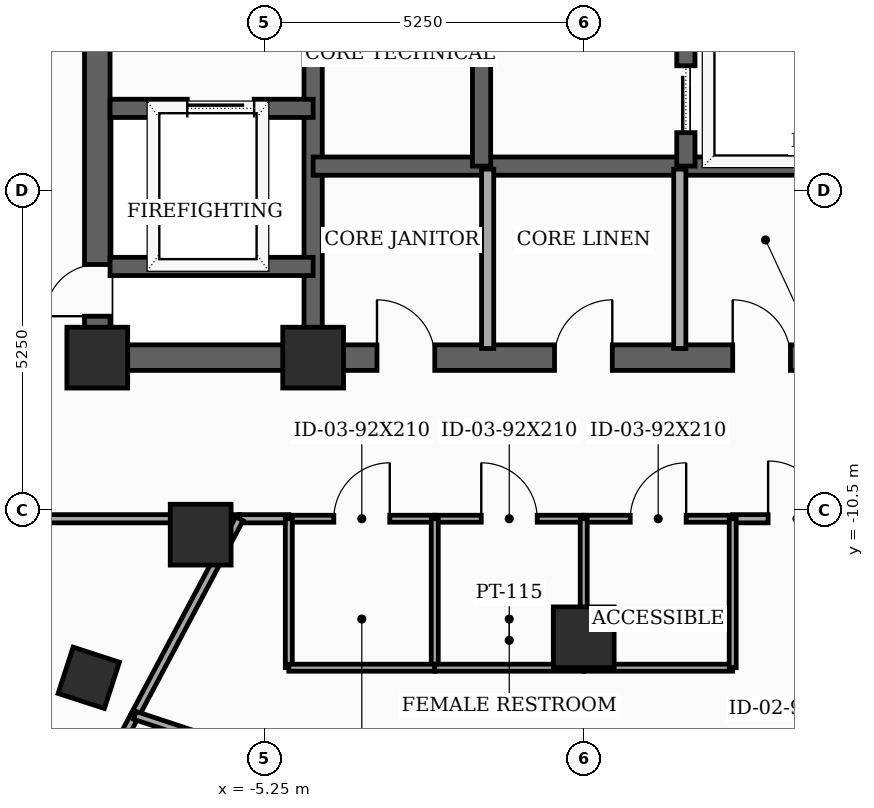
"""IFC4 building model, lengths in metres.
Left out: names, types, materials, properties, quantities, classifications, styles, units other than length and angle.
Written with IfcOpenShell. Run it as: python <this file> out.ifc"""

import sys

from ifc_helpers import new_model, si_unit, direction, frame, frame_2d, origin, origin_2d, place, context, subcontext, project, spatial, rectangle, extrude, element, fill, save


model = new_model("IFC4")
c1 = context("Model", 3, precision=1e-05, world=origin(), true_north=direction((0.0, 1.0)))
c2 = subcontext(c1, "Body", "Model", "MODEL_VIEW")
j1 = project(units=[si_unit("LENGTHUNIT", "METRE"), si_unit("PLANEANGLEUNIT", "RADIAN")], contexts=[c1])
p1 = place(None, origin())
s1 = spatial("IfcSite", under=j1, at=p1, CompositionType="ELEMENT")
p2 = place(p1, origin())
s2 = spatial("IfcBuilding", under=s1, at=p2, CompositionType="ELEMENT")
p3 = place(p2, frame((0.0, 0.0, 301.7)))
s3 = spatial("IfcBuildingStorey", under=s2, at=p3, CompositionType="ELEMENT", Elevation=301.7)
for number, where, z_axis, x_axis in (
    (1, (-8.0, -8.0, 0.0), (0.0, 0.0, 1.0), (1.0, 0.0, 0.0)),
    (2, (-4.45, -8.0, 0.0), (0.0, 0.0, 1.0), (1.0, 0.0, 0.0)),
    (3, (-6.3, -10.912, 0.0), (0.0, 0.0, 1.0), (1.0, 0.0, 0.0)),
    (4, (0.0, -12.6, 0.0), (0.0, 0.0, 1.0), (1.0, 0.0, 0.0)),
):
    element("IfcColumn", number, at=place(p3, frame(where, z_axis=z_axis, x_axis=x_axis)), inside=s3, PredefinedType="COLUMN", context=c2, shape_type="SweptSolid", body=[
        extrude(rectangle(XDim=1.0, YDim=1.0, at=origin_2d()), origin(), (0.0, 0.0, 1.0), 3.7),
    ])
p4 = place(p3, frame((-8.14, -13.266, 0.0), z_axis=(0.0, 0.0, 1.0), x_axis=(0.309016994375, 0.951056516295, 0.0)))
e5 = element("IfcColumn", 5, at=p4, inside=s3, PredefinedType="COLUMN", context=c2, shape_type="SweptSolid", body=[
    extrude(rectangle(XDim=0.8, YDim=0.8, at=origin_2d()), origin(), (0.0, 0.0, 1.0), 3.7),
])
p5 = place(p3, frame((-8.0, -8.0, 0.0), z_axis=(0.0, 0.0, 1.0), x_axis=(0.0, 1.0, 0.0)))
e6 = element("IfcWall", 6, at=p5, inside=s3, PredefinedType="SHEAR", context=c2, shape_type="SweptSolid", body=[
    extrude(rectangle(XDim=16.0, YDim=0.42, at=frame_2d((8.0, 0.0))), origin(), (0.0, 0.0, 1.0), 3.5),
])
p6 = place(p5, frame((0.681, 0.0, 0.0)))
e7 = element("IfcOpeningElement", 7, at=p6, cuts=e6, PredefinedType="OPENING", context=c2, shape_type="SweptSolid", body=[
    extrude(rectangle(XDim=0.85, YDim=2.02, at=frame_2d((0.425, 1.01))), frame((0.0, 0.22, 0.0), z_axis=(0.0, -1.0, 0.0), x_axis=(1.0, 0.0, 0.0)), (0.0, 0.0, 1.0), 0.44),
])
p7 = place(p5, frame((5.35, 0.0, 0.0)))
e8 = element("IfcOpeningElement", 8, at=p7, cuts=e6, PredefinedType="OPENING", context=c2, shape_type="SweptSolid", body=[
    extrude(rectangle(XDim=1.05, YDim=2.15, at=frame_2d((0.525, 1.075))), frame((0.0, 0.22, 0.0), z_axis=(0.0, -1.0, 0.0), x_axis=(1.0, 0.0, 0.0)), (0.0, 0.0, 1.0), 0.44),
])
p8 = place(p3, frame((-8.0, -8.0, 0.0), z_axis=(0.0, 0.0, 1.0), x_axis=(1.0, 0.0, 0.0)))
e9 = element("IfcWall", 9, at=p8, inside=s3, PredefinedType="SHEAR", context=c2, shape_type="SweptSolid", body=[
    extrude(rectangle(XDim=16.0, YDim=0.42, at=frame_2d((8.0, 0.0))), origin(), (0.0, 0.0, 1.0), 3.5),
])
p9 = place(p8, frame((4.6, 0.0, 0.0)))
e10 = element("IfcOpeningElement", 10, at=p9, cuts=e9, PredefinedType="OPENING", context=c2, shape_type="SweptSolid", body=[
    extrude(rectangle(XDim=0.95, YDim=2.1, at=frame_2d((0.475, 1.05))), frame((0.0, 0.22, 0.0), z_axis=(0.0, -1.0, 0.0), x_axis=(1.0, 0.0, 0.0)), (0.0, 0.0, 1.0), 0.44),
])
p10 = place(p8, frame((7.52, 0.0, 0.0)))
e11 = element("IfcOpeningElement", 11, at=p10, cuts=e9, PredefinedType="OPENING", context=c2, shape_type="SweptSolid", body=[
    extrude(rectangle(XDim=0.95, YDim=2.1, at=frame_2d((0.475, 1.05))), frame((0.0, 0.22, 0.0), z_axis=(0.0, -1.0, 0.0), x_axis=(1.0, 0.0, 0.0)), (0.0, 0.0, 1.0), 0.44),
])
p11 = place(p8, frame((10.45, 0.0, 0.0)))
e12 = element("IfcOpeningElement", 12, at=p11, cuts=e9, PredefinedType="OPENING", context=c2, shape_type="SweptSolid", body=[
    extrude(rectangle(XDim=0.95, YDim=2.1, at=frame_2d((0.475, 1.05))), frame((0.0, 0.22, 0.0), z_axis=(0.0, -1.0, 0.0), x_axis=(1.0, 0.0, 0.0)), (0.0, 0.0, 1.0), 0.44),
])
p12 = place(p3, frame((-4.45, -7.79, 0.0), z_axis=(0.0, 0.0, 1.0), x_axis=(0.0, 1.0, 0.0)))
e13 = element("IfcWall", 13, at=p12, inside=s3, PredefinedType="SHEAR", context=c2, shape_type="SweptSolid", body=[
    extrude(rectangle(XDim=15.58, YDim=0.3, at=frame_2d((7.79, 0.0))), origin(), (0.0, 0.0, 1.0), 3.5),
])
p13 = place(p3, frame((-7.79, -3.9, 0.0), z_axis=(0.0, 0.0, 1.0), x_axis=(1.0, 0.0, 0.0)))
e14 = element("IfcWall", 14, at=p13, inside=s3, PredefinedType="SHEAR", context=c2, shape_type="SweptSolid", body=[
    extrude(rectangle(XDim=3.34, YDim=0.3, at=frame_2d((1.67, 0.0))), origin(), (0.0, 0.0, 1.0), 3.5),
])
p14 = place(p13, frame((1.27, 0.0, 0.0)))
e15 = element("IfcOpeningElement", 15, at=p14, cuts=e14, PredefinedType="OPENING", context=c2, shape_type="SweptSolid", body=[
    extrude(rectangle(XDim=1.1, YDim=2.1, at=frame_2d((0.55, 1.05))), frame((0.0, 0.16, 0.0), z_axis=(0.0, -1.0, 0.0), x_axis=(1.0, 0.0, 0.0)), (0.0, 0.0, 1.0), 0.32),
])
p15 = place(p3, frame((-7.79, -6.5, 0.0), z_axis=(0.0, 0.0, 1.0), x_axis=(1.0, 0.0, 0.0)))
e16 = element("IfcWall", 16, at=p15, inside=s3, PredefinedType="SHEAR", context=c2, shape_type="SweptSolid", body=[
    extrude(rectangle(XDim=3.34, YDim=0.3, at=frame_2d((1.67, 0.0))), origin(), (0.0, 0.0, 1.0), 3.5),
])
p16 = place(p3, frame((-4.45, -4.85, 0.0), z_axis=(0.0, 0.0, 1.0), x_axis=(1.0, 0.0, 0.0)))
e17 = element("IfcWall", 17, at=p16, inside=s3, PredefinedType="SHEAR", context=c2, shape_type="SweptSolid", body=[
    extrude(rectangle(XDim=8.9, YDim=0.3, at=frame_2d((4.45, 0.0))), origin(), (0.0, 0.0, 1.0), 3.5),
])
p17 = place(p3, frame((-1.68, -4.85, 0.0), z_axis=(0.0, 0.0, 1.0), x_axis=(0.0, 1.0, 0.0)))
e18 = element("IfcWall", 18, at=p17, inside=s3, PredefinedType="SHEAR", context=c2, shape_type="SweptSolid", body=[
    extrude(rectangle(XDim=12.64, YDim=0.3, at=frame_2d((6.32, 0.0))), origin(), (0.0, 0.0, 1.0), 3.5),
])
p18 = place(p17, frame((3.5, 0.0, 0.0)))
e19 = element("IfcOpeningElement", 19, at=p18, cuts=e18, PredefinedType="OPENING", context=c2, shape_type="SweptSolid", body=[
    extrude(rectangle(XDim=0.95, YDim=2.1, at=frame_2d((0.475, 1.05))), frame((0.0, 0.16, 0.0), z_axis=(0.0, -1.0, 0.0), x_axis=(1.0, 0.0, 0.0)), (0.0, 0.0, 1.0), 0.32),
])
p19 = place(p17, frame((9.8, 0.0, 0.0)))
e20 = element("IfcOpeningElement", 20, at=p19, cuts=e18, PredefinedType="OPENING", context=c2, shape_type="SweptSolid", body=[
    extrude(rectangle(XDim=0.95, YDim=2.1, at=frame_2d((0.475, 1.05))), frame((0.0, 0.16, 0.0), z_axis=(0.0, -1.0, 0.0), x_axis=(1.0, 0.0, 0.0)), (0.0, 0.0, 1.0), 0.32),
])
p20 = place(p3, frame((1.68, -4.85, 0.0), z_axis=(0.0, 0.0, 1.0), x_axis=(0.0, 1.0, 0.0)))
e21 = element("IfcWall", 21, at=p20, inside=s3, PredefinedType="SHEAR", context=c2, shape_type="SweptSolid", body=[
    extrude(rectangle(XDim=12.64, YDim=0.3, at=frame_2d((6.32, 0.0))), origin(), (0.0, 0.0, 1.0), 3.5),
])
p21 = place(p20, frame((0.55, 0.0, 0.0)))
e22 = element("IfcOpeningElement", 22, at=p21, cuts=e21, PredefinedType="OPENING", context=c2, shape_type="SweptSolid", body=[
    extrude(rectangle(XDim=1.1, YDim=2.1, at=frame_2d((0.55, 1.05))), frame((0.0, 0.16, 0.0), z_axis=(0.0, -1.0, 0.0), x_axis=(1.0, 0.0, 0.0)), (0.0, 0.0, 1.0), 0.32),
])
p22 = place(p20, frame((2.65, 0.0, 0.0)))
e23 = element("IfcOpeningElement", 23, at=p22, cuts=e21, PredefinedType="OPENING", context=c2, shape_type="SweptSolid", body=[
    extrude(rectangle(XDim=1.1, YDim=2.1, at=frame_2d((0.55, 1.05))), frame((0.0, 0.16, 0.0), z_axis=(0.0, -1.0, 0.0), x_axis=(1.0, 0.0, 0.0)), (0.0, 0.0, 1.0), 0.32),
])
p23 = place(p20, frame((4.75, 0.0, 0.0)))
e24 = element("IfcOpeningElement", 24, at=p23, cuts=e21, PredefinedType="OPENING", context=c2, shape_type="SweptSolid", body=[
    extrude(rectangle(XDim=1.1, YDim=2.1, at=frame_2d((0.55, 1.05))), frame((0.0, 0.16, 0.0), z_axis=(0.0, -1.0, 0.0), x_axis=(1.0, 0.0, 0.0)), (0.0, 0.0, 1.0), 0.32),
])
p24 = place(p20, frame((6.8, 0.0, 0.0)))
e25 = element("IfcOpeningElement", 25, at=p24, cuts=e21, PredefinedType="OPENING", context=c2, shape_type="SweptSolid", body=[
    extrude(rectangle(XDim=0.92, YDim=2.1, at=frame_2d((0.46, 1.05))), frame((0.0, 0.16, 0.0), z_axis=(0.0, -1.0, 0.0), x_axis=(1.0, 0.0, 0.0)), (0.0, 0.0, 1.0), 0.32),
])
p25 = place(p20, frame((9.8, 0.0, 0.0)))
e26 = element("IfcOpeningElement", 26, at=p25, cuts=e21, PredefinedType="OPENING", context=c2, shape_type="SweptSolid", body=[
    extrude(rectangle(XDim=0.95, YDim=2.1, at=frame_2d((0.475, 1.05))), frame((0.0, 0.16, 0.0), z_axis=(0.0, -1.0, 0.0), x_axis=(1.0, 0.0, 0.0)), (0.0, 0.0, 1.0), 0.32),
])
for number, where, z_axis, x_axis in (
    (27, (-1.58, -7.85, 0.0), (0.0, 0.0, 1.0), (0.0, 1.0, 0.0)),
    (28, (1.58, -7.85, 0.0), (0.0, 0.0, 1.0), (0.0, 1.0, 0.0)),
):
    element("IfcWall", number, at=place(p3, frame(where, z_axis=z_axis, x_axis=x_axis)), inside=s3, PredefinedType="SOLIDWALL", context=c2, shape_type="SweptSolid", body=[
        extrude(rectangle(XDim=2.95, YDim=0.2, at=frame_2d((1.475, 0.0))), origin(), (0.0, 0.0, 1.0), 2.885),
    ])
p26 = place(p3, frame((-10.15, -10.65, 0.0), z_axis=(0.0, 0.0, 1.0), x_axis=(1.0, 0.0, 0.0)))
e29 = element("IfcWall", 29, at=p26, inside=s3, PredefinedType="PARTITIONING", context=c2, shape_type="SweptSolid", body=[
    extrude(rectangle(XDim=4.487, YDim=0.135, at=frame_2d((2.243, 0.0))), origin(), (0.0, 0.0, 1.0), 2.885),
])
p27 = place(p3, frame((-4.85, -10.65, 0.0), z_axis=(0.0, 0.0, 1.0), x_axis=(1.0, 0.0, 0.0)))
e30 = element("IfcWall", 30, at=p27, inside=s3, PredefinedType="PARTITIONING", context=c2, shape_type="SweptSolid", body=[
    extrude(rectangle(XDim=2.4, YDim=0.115, at=frame_2d((1.2, 0.0))), origin(), (0.0, 0.0, 1.0), 3.5),
])
p28 = place(p27, frame((0.74, 0.0, 0.0)))
e31 = element("IfcOpeningElement", 31, at=p28, cuts=e30, PredefinedType="OPENING", context=c2, shape_type="SweptSolid", body=[
    extrude(rectangle(XDim=0.92, YDim=2.1, at=frame_2d((0.46, 1.05))), frame((0.0, 0.067, 0.0), z_axis=(0.0, -1.0, 0.0), x_axis=(1.0, 0.0, 0.0)), (0.0, 0.0, 1.0), 0.135),
])
p29 = place(p3, frame((-2.45, -10.65, 0.0), z_axis=(0.0, 0.0, 1.0), x_axis=(1.0, 0.0, 0.0)))
e32 = element("IfcWall", 32, at=p29, inside=s3, PredefinedType="PARTITIONING", context=c2, shape_type="SweptSolid", body=[
    extrude(rectangle(XDim=2.45, YDim=0.115, at=frame_2d((1.225, 0.0))), origin(), (0.0, 0.0, 1.0), 2.885),
])
p30 = place(p29, frame((0.765, 0.0, 0.0)))
e33 = element("IfcOpeningElement", 33, at=p30, cuts=e32, PredefinedType="OPENING", context=c2, shape_type="SweptSolid", body=[
    extrude(rectangle(XDim=0.92, YDim=2.1, at=frame_2d((0.46, 1.05))), frame((0.0, 0.067, 0.0), z_axis=(0.0, -1.0, 0.0), x_axis=(1.0, 0.0, 0.0)), (0.0, 0.0, 1.0), 0.135),
])
p31 = place(p3, frame((0.0, -10.65, 0.0), z_axis=(0.0, 0.0, 1.0), x_axis=(1.0, 0.0, 0.0)))
e34 = element("IfcWall", 34, at=p31, inside=s3, PredefinedType="PARTITIONING", context=c2, shape_type="SweptSolid", body=[
    extrude(rectangle(XDim=2.45, YDim=0.115, at=frame_2d((1.225, 0.0))), origin(), (0.0, 0.0, 1.0), 3.5),
])
p32 = place(p31, frame((0.765, 0.0, 0.0)))
e35 = element("IfcOpeningElement", 35, at=p32, cuts=e34, PredefinedType="OPENING", context=c2, shape_type="SweptSolid", body=[
    extrude(rectangle(XDim=0.92, YDim=2.1, at=frame_2d((0.46, 1.05))), frame((0.0, 0.067, 0.0), z_axis=(0.0, -1.0, 0.0), x_axis=(1.0, 0.0, 0.0)), (0.0, 0.0, 1.0), 0.135),
])
p33 = place(p3, frame((-5.663, -10.65, 0.0), z_axis=(0.0, 0.0, 1.0), x_axis=(1.0, 0.0, 0.0)))
e36 = element("IfcWall", 36, at=p33, inside=s3, PredefinedType="PARTITIONING", context=c2, shape_type="SweptSolid", body=[
    extrude(rectangle(XDim=0.813, YDim=0.135, at=frame_2d((0.406, 0.0))), origin(), (0.0, 0.0, 1.0), 3.5),
])
p34 = place(p3, frame((2.45, -10.65, 0.0), z_axis=(0.0, 0.0, 1.0), x_axis=(1.0, 0.0, 0.0)))
e37 = element("IfcWall", 37, at=p34, inside=s3, PredefinedType="PARTITIONING", context=c2, shape_type="SweptSolid", body=[
    extrude(rectangle(XDim=5.288, YDim=0.135, at=frame_2d((2.644, 0.0))), origin(), (0.0, 0.0, 1.0), 2.885),
])
p35 = place(p34, frame((0.583, 0.0, 0.0)))
e38 = element("IfcOpeningElement", 38, at=p35, cuts=e37, PredefinedType="OPENING", context=c2, shape_type="SweptSolid", body=[
    extrude(rectangle(XDim=0.95, YDim=2.1, at=frame_2d((0.475, 1.05))), frame((0.0, 0.077, 0.0), z_axis=(0.0, -1.0, 0.0), x_axis=(1.0, 0.0, 0.0)), (0.0, 0.0, 1.0), 0.155),
])
p36 = place(p3, frame((-7.382, -13.884, 0.0), z_axis=(0.0, 0.0, 1.0), x_axis=(0.469338791783, 0.88301817565, 0.0)))
e39 = element("IfcWall", 39, at=p36, inside=s3, PredefinedType="PARTITIONING", context=c2, shape_type="SweptSolid", body=[
    extrude(rectangle(XDim=3.663, YDim=0.135, at=frame_2d((1.831, 0.0))), origin(), (0.0, 0.0, 1.0), 2.885),
])
p37 = place(p3, frame((-8.042, -15.124, 0.0), z_axis=(0.0, 0.0, 1.0), x_axis=(0.469595679185, 0.882881587808, 0.0)))
e40 = element("IfcWall", 40, at=p37, inside=s3, PredefinedType="PARTITIONING", context=c2, shape_type="SweptSolid", body=[
    extrude(rectangle(XDim=1.405, YDim=0.135, at=frame_2d((0.702, 0.0))), origin(), (0.0, 0.0, 1.0), 3.035),
])
for number, where, z_axis, x_axis in (
    (41, (-2.45, -13.1, 0.0), (0.0, 0.0, 1.0), (0.0, 1.0, 0.0)),
    (42, (-4.85, -10.65, 0.0), (0.0, 0.0, 1.0), (0.0, -1.0, 0.0)),
):
    element("IfcWall", number, at=place(p3, frame(where, z_axis=z_axis, x_axis=x_axis)), inside=s3, PredefinedType="PARTITIONING", context=c2, shape_type="SweptSolid", body=[
        extrude(rectangle(XDim=2.45, YDim=0.115, at=frame_2d((1.225, 0.0))), origin(), (0.0, 0.0, 1.0), 2.885),
    ])
p38 = place(p3, frame((-4.85, -13.1, 0.0), z_axis=(0.0, 0.0, 1.0), x_axis=(1.0, 0.0, 0.0)))
e43 = element("IfcWall", 43, at=p38, inside=s3, PredefinedType="PARTITIONING", context=c2, shape_type="SweptSolid", body=[
    extrude(rectangle(XDim=2.4, YDim=0.115, at=frame_2d((1.2, 0.0))), origin(), (0.0, 0.0, 1.0), 3.5),
])
p39 = place(p3, frame((0.0, -13.1, 0.0), z_axis=(0.0, 0.0, 1.0), x_axis=(0.0, 1.0, 0.0)))
e44 = element("IfcWall", 44, at=p39, inside=s3, PredefinedType="PARTITIONING", context=c2, shape_type="SweptSolid", body=[
    extrude(rectangle(XDim=2.45, YDim=0.115, at=frame_2d((1.225, 0.0))), origin(), (0.0, 0.0, 1.0), 2.885),
])
for number, where, z_axis, x_axis in (
    (45, (-2.45, -13.1, 0.0), (0.0, 0.0, 1.0), (1.0, 0.0, 0.0)),
    (46, (0.0, -13.1, 0.0), (0.0, 0.0, 1.0), (1.0, 0.0, 0.0)),
):
    element("IfcWall", number, at=place(p3, frame(where, z_axis=z_axis, x_axis=x_axis)), inside=s3, PredefinedType="PARTITIONING", context=c2, shape_type="SweptSolid", body=[
        extrude(rectangle(XDim=2.45, YDim=0.115, at=frame_2d((1.225, 0.0))), origin(), (0.0, 0.0, 1.0), 3.035),
    ])
p40 = place(p3, frame((2.45, -13.1, 0.0), z_axis=(0.0, 0.0, 1.0), x_axis=(0.0, 1.0, 0.0)))
e47 = element("IfcWall", 47, at=p40, inside=s3, PredefinedType="PARTITIONING", context=c2, shape_type="SweptSolid", body=[
    extrude(rectangle(XDim=2.45, YDim=0.115, at=frame_2d((1.225, 0.0))), origin(), (0.0, 0.0, 1.0), 2.885),
])
p41 = place(p3, frame((-7.382, -13.884, 0.0), z_axis=(0.0, 0.0, 1.0), x_axis=(0.949247116003, -0.314531258795, 0.0)))
e48 = element("IfcWall", 48, at=p41, inside=s3, PredefinedType="PARTITIONING", context=c2, shape_type="SweptSolid", body=[
    extrude(rectangle(XDim=5.7, YDim=0.135, at=frame_2d((2.85, 0.0))), origin(), (0.0, 0.0, 1.0), 3.035),
])
p42 = place(p6, origin())
e49 = element("IfcDoor", 49, at=p42, inside=s3, OperationType="SINGLE_SWING_LEFT", PredefinedType="TRAPDOOR", context=c2, shape_type="SweptSolid", body=[
    extrude(rectangle(XDim=0.85, YDim=2.02, at=frame_2d((0.425, 1.01))), frame((0.0, 0.025, 0.0), z_axis=(0.0, -1.0, 0.0), x_axis=(1.0, 0.0, 0.0)), (0.0, 0.0, 1.0), 0.05),
])
fill(e7, e49)
p43 = place(p9, origin())
e50 = element("IfcDoor", 50, at=p43, inside=s3, OperationType="SINGLE_SWING_LEFT", PredefinedType="DOOR", context=c2, shape_type="SweptSolid", body=[
    extrude(rectangle(XDim=0.95, YDim=2.1, at=frame_2d((0.475, 1.05))), frame((0.0, 0.025, 0.0), z_axis=(0.0, -1.0, 0.0), x_axis=(1.0, 0.0, 0.0)), (0.0, 0.0, 1.0), 0.05),
])
fill(e10, e50)
p44 = place(p10, origin())
e51 = element("IfcDoor", 51, at=p44, inside=s3, OperationType="SINGLE_SWING_RIGHT", PredefinedType="DOOR", context=c2, shape_type="SweptSolid", body=[
    extrude(rectangle(XDim=0.95, YDim=2.1, at=frame_2d((0.475, 1.05))), frame((0.0, 0.025, 0.0), z_axis=(0.0, -1.0, 0.0), x_axis=(1.0, 0.0, 0.0)), (0.0, 0.0, 1.0), 0.05),
])
fill(e11, e51)
p45 = place(p11, origin())
e52 = element("IfcDoor", 52, at=p45, inside=s3, OperationType="SINGLE_SWING_LEFT", PredefinedType="DOOR", context=c2, shape_type="SweptSolid", body=[
    extrude(rectangle(XDim=0.95, YDim=2.1, at=frame_2d((0.475, 1.05))), frame((0.0, 0.025, 0.0), z_axis=(0.0, -1.0, 0.0), x_axis=(1.0, 0.0, 0.0)), (0.0, 0.0, 1.0), 0.05),
])
fill(e12, e52)
p46 = place(p14, origin())
e53 = element("IfcDoor", 53, at=p46, inside=s3, OperationType="SLIDING_TO_LEFT", PredefinedType="DOOR", context=c2, shape_type="SweptSolid", body=[
    extrude(rectangle(XDim=1.1, YDim=2.1, at=frame_2d((0.55, 1.05))), frame((0.0, 0.025, 0.0), z_axis=(0.0, -1.0, 0.0), x_axis=(1.0, 0.0, 0.0)), (0.0, 0.0, 1.0), 0.05),
])
fill(e15, e53)
p47 = place(p21, origin())
e54 = element("IfcDoor", 54, at=p47, inside=s3, OperationType="SLIDING_TO_LEFT", PredefinedType="DOOR", context=c2, shape_type="SweptSolid", body=[
    extrude(rectangle(XDim=1.1, YDim=2.1, at=frame_2d((0.55, 1.05))), frame((0.0, 0.025, 0.0), z_axis=(0.0, -1.0, 0.0), x_axis=(1.0, 0.0, 0.0)), (0.0, 0.0, 1.0), 0.05),
])
fill(e22, e54)
p48 = place(p28, origin())
e55 = element("IfcDoor", 55, at=p48, inside=s3, OperationType="SINGLE_SWING_RIGHT", PredefinedType="DOOR", context=c2, shape_type="SweptSolid", body=[
    extrude(rectangle(XDim=0.92, YDim=2.1, at=frame_2d((0.46, 1.05))), frame((0.0, 0.025, 0.0), z_axis=(0.0, -1.0, 0.0), x_axis=(1.0, 0.0, 0.0)), (0.0, 0.0, 1.0), 0.05),
])
fill(e31, e55)
p49 = place(p30, origin())
e56 = element("IfcDoor", 56, at=p49, inside=s3, OperationType="SINGLE_SWING_LEFT", PredefinedType="DOOR", context=c2, shape_type="SweptSolid", body=[
    extrude(rectangle(XDim=0.92, YDim=2.1, at=frame_2d((0.46, 1.05))), frame((0.0, 0.025, 0.0), z_axis=(0.0, -1.0, 0.0), x_axis=(1.0, 0.0, 0.0)), (0.0, 0.0, 1.0), 0.05),
])
fill(e33, e56)
p50 = place(p32, origin())
e57 = element("IfcDoor", 57, at=p50, inside=s3, OperationType="SINGLE_SWING_RIGHT", PredefinedType="DOOR", context=c2, shape_type="SweptSolid", body=[
    extrude(rectangle(XDim=0.92, YDim=2.1, at=frame_2d((0.46, 1.05))), frame((0.0, 0.025, 0.0), z_axis=(0.0, -1.0, 0.0), x_axis=(1.0, 0.0, 0.0)), (0.0, 0.0, 1.0), 0.05),
])
fill(e35, e57)
p51 = place(p35, origin())
e58 = element("IfcDoor", 58, at=p51, inside=s3, OperationType="SINGLE_SWING_LEFT", PredefinedType="DOOR", context=c2, shape_type="SweptSolid", body=[
    extrude(rectangle(XDim=0.95, YDim=2.1, at=frame_2d((0.475, 1.05))), frame((0.0, 0.025, 0.0), z_axis=(0.0, -1.0, 0.0), x_axis=(1.0, 0.0, 0.0)), (0.0, 0.0, 1.0), 0.05),
])
fill(e38, e58)
save(model, sys.argv[1])
